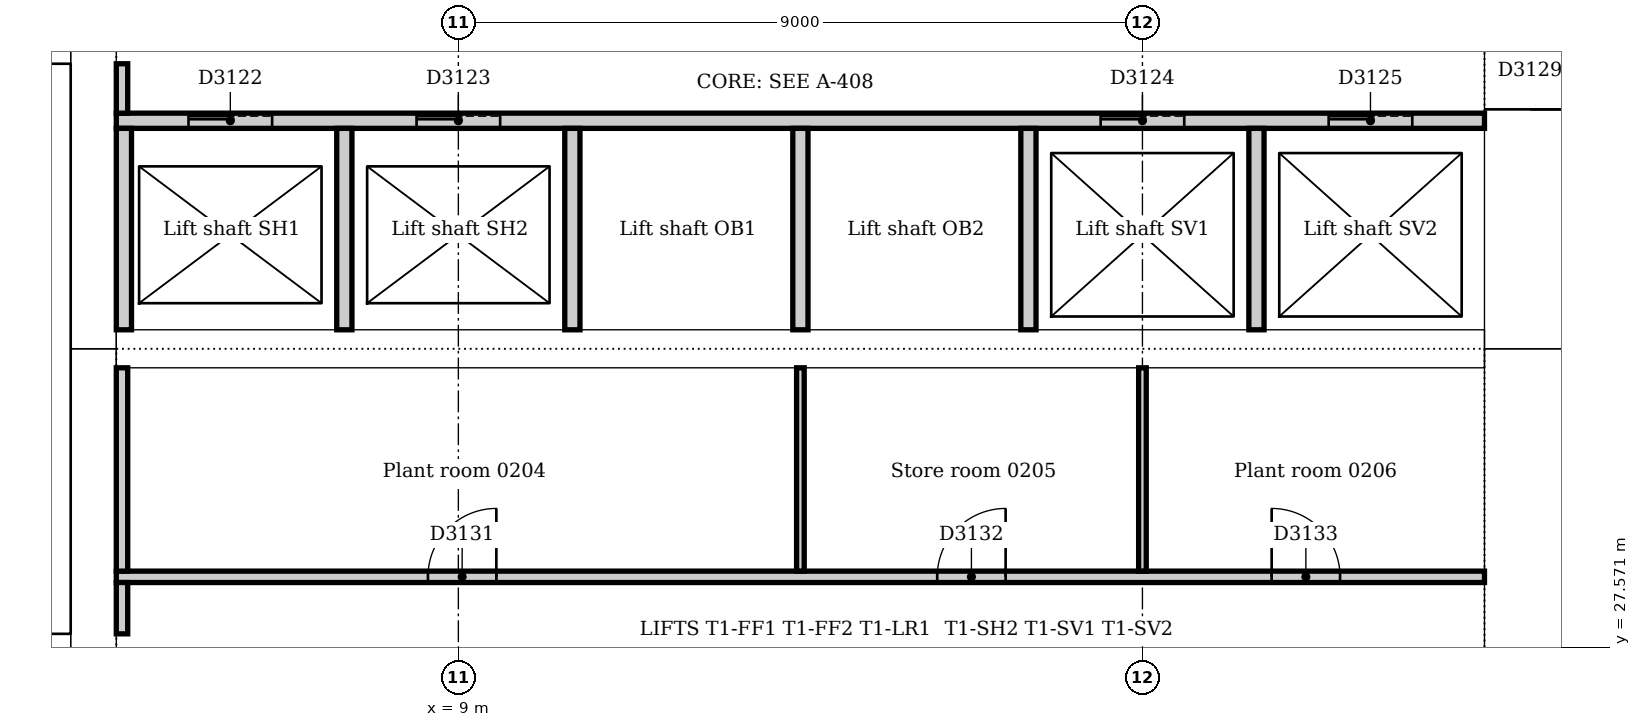
"""IFC4 building model, lengths in metres.
Left out: names, types, materials, properties, quantities, classifications, styles, units other than length and angle.
Written with IfcOpenShell. Run it as: python <this file> out.ifc"""

import sys

from ifc_helpers import new_model, si_unit, direction, frame, frame_2d, origin, place, context, subcontext, project, spatial, rectangle, extrude, element, fill, save


model = new_model("IFC4")
c1 = context("Model", 3, precision=1e-05, world=origin(), true_north=direction((0.0, 1.0)))
c2 = subcontext(c1, "Body", "Model", "MODEL_VIEW")
j1 = project(units=[si_unit("LENGTHUNIT", "METRE"), si_unit("PLANEANGLEUNIT", "RADIAN")], contexts=[c1])
p1 = place(None, origin())
s1 = spatial("IfcSite", under=j1, at=p1, CompositionType="ELEMENT")
p2 = place(p1, origin())
s2 = spatial("IfcBuilding", under=s1, at=p2, CompositionType="ELEMENT")
p3 = place(p2, frame((0.0, 0.0, 11.0)))
s3 = spatial("IfcBuildingStorey", under=s2, at=p3, CompositionType="ELEMENT", Elevation=11.0)
p4 = place(p3, frame((23.1, 21.0, 0.0), z_axis=(0.0, 0.0, 1.0), x_axis=(0.0, 1.0, 0.0)))
e1 = element("IfcWall", 1, at=p4, inside=s3, PredefinedType="SOLIDWALL", context=c2, shape_type="SweptSolid", body=[
    extrude(rectangle(XDim=10.5, YDim=1.2, at=frame_2d((5.25, 0.0))), origin(), (0.0, 0.0, 1.0), 5.0),
])
p5 = place(p4, frame((4.35, 0.0, 0.0)))
e2 = element("IfcOpeningElement", 2, at=p5, cuts=e1, PredefinedType="OPENING", context=c2, shape_type="SweptSolid", body=[
    extrude(rectangle(XDim=1.8, YDim=2.1, at=frame_2d((0.9, 1.05))), frame((0.0, 0.61, 0.0), z_axis=(0.0, -1.0, 0.0), x_axis=(1.0, 0.0, 0.0)), (0.0, 0.0, 1.0), 1.22),
])
p6 = place(p3, frame((23.1, 31.5, 0.0), z_axis=(0.0, 0.0, 1.0), x_axis=(0.0, 1.0, 0.0)))
e3 = element("IfcWall", 3, at=p6, inside=s3, PredefinedType="SOLIDWALL", context=c2, shape_type="SweptSolid", body=[
    extrude(rectangle(XDim=10.5, YDim=1.2, at=frame_2d((5.25, 0.0))), origin(), (0.0, 0.0, 1.0), 5.0),
])
p7 = place(p6, frame((3.15, 0.0, 0.0)))
e4 = element("IfcOpeningElement", 4, at=p7, cuts=e3, PredefinedType="OPENING", context=c2, shape_type="SweptSolid", body=[
    extrude(rectangle(XDim=1.0, YDim=2.1, at=frame_2d((0.5, 1.05))), frame((0.0, 0.61, 0.0), z_axis=(0.0, -1.0, 0.0), x_axis=(1.0, 0.0, 0.0)), (0.0, 0.0, 1.0), 1.22),
])
p8 = place(p6, frame((5.2, 0.0, 0.0)))
e5 = element("IfcOpeningElement", 5, at=p8, cuts=e3, PredefinedType="OPENING", context=c2, shape_type="SweptSolid", body=[
    extrude(rectangle(XDim=1.0, YDim=2.1, at=frame_2d((0.5, 1.05))), frame((0.0, 0.61, 0.0), z_axis=(0.0, -1.0, 0.0), x_axis=(1.0, 0.0, 0.0)), (0.0, 0.0, 1.0), 1.22),
])
p9 = place(p3, frame((4.2, 42.0, 0.0), z_axis=(0.0, 0.0, 1.0), x_axis=(0.0, -1.0, 0.0)))
e6 = element("IfcWall", 6, at=p9, inside=s3, PredefinedType="SOLIDWALL", context=c2, shape_type="SweptSolid", body=[
    extrude(rectangle(XDim=10.5, YDim=0.6, at=frame_2d((5.25, 0.0))), origin(), (0.0, 0.0, 1.0), 5.0),
])
p10 = place(p9, frame((5.3, 0.0, 0.0)))
e7 = element("IfcOpeningElement", 7, at=p10, cuts=e6, PredefinedType="OPENING", context=c2, shape_type="SweptSolid", body=[
    extrude(rectangle(XDim=1.0, YDim=2.1, at=frame_2d((0.5, 1.05))), frame((0.0, 0.31, 0.0), z_axis=(0.0, -1.0, 0.0), x_axis=(1.0, 0.0, 0.0)), (0.0, 0.0, 1.0), 0.62),
])
p11 = place(p3, frame((4.2, 31.5, 0.0), z_axis=(0.0, 0.0, 1.0), x_axis=(0.0, -1.0, 0.0)))
e8 = element("IfcWall", 8, at=p11, inside=s3, PredefinedType="SOLIDWALL", context=c2, shape_type="SweptSolid", body=[
    extrude(rectangle(XDim=10.5, YDim=0.6, at=frame_2d((5.25, 0.0))), origin(), (0.0, 0.0, 1.0), 5.0),
])
p12 = place(p11, frame((4.25, 0.0, 0.0)))
e9 = element("IfcOpeningElement", 9, at=p12, cuts=e8, PredefinedType="OPENING", context=c2, shape_type="SweptSolid", body=[
    extrude(rectangle(XDim=1.0, YDim=2.1, at=frame_2d((0.5, 1.05))), frame((0.0, 0.31, 0.0), z_axis=(0.0, -1.0, 0.0), x_axis=(1.0, 0.0, 0.0)), (0.0, 0.0, 1.0), 0.62),
])
p13 = place(p3, frame((4.5, 31.5, 0.0), z_axis=(0.0, 0.0, 1.0), x_axis=(1.0, 0.0, 0.0)))
e10 = element("IfcWall", 10, at=p13, inside=s3, PredefinedType="SOLIDWALL", context=c2, shape_type="SweptSolid", body=[
    extrude(rectangle(XDim=18.0, YDim=0.5, at=frame_2d((9.0, 0.0))), origin(), (0.0, 0.0, 1.0), 5.0),
])
p14 = place(p3, frame((3.9, 27.625, 0.0), z_axis=(0.0, 0.0, 1.0), x_axis=(-1.0, 0.0, 0.0)))
e11 = element("IfcWall", 11, at=p14, inside=s3, PredefinedType="SOLIDWALL", context=c2, shape_type="SweptSolid", body=[
    extrude(rectangle(XDim=3.54, YDim=0.25, at=frame_2d((1.77, 0.0))), origin(), (0.0, 0.0, 1.0), 5.0),
])
p15 = place(p14, frame((0.4, 0.0, 0.0)))
e12 = element("IfcOpeningElement", 12, at=p15, cuts=e11, PredefinedType="OPENING", context=c2, shape_type="SweptSolid", body=[
    extrude(rectangle(XDim=1.0, YDim=2.1, at=frame_2d((0.5, 1.05))), frame((0.0, 0.135, 0.0), z_axis=(0.0, -1.0, 0.0), x_axis=(1.0, 0.0, 0.0)), (0.0, 0.0, 1.0), 0.27),
])
p16 = place(p3, frame((0.36, 35.375, 0.0), z_axis=(0.0, 0.0, 1.0), x_axis=(1.0, 0.0, 0.0)))
e13 = element("IfcWall", 13, at=p16, inside=s3, PredefinedType="SOLIDWALL", context=c2, shape_type="SweptSolid", body=[
    extrude(rectangle(XDim=3.54, YDim=0.25, at=frame_2d((1.77, 0.0))), origin(), (0.0, 0.0, 1.0), 5.0),
])
p17 = place(p16, frame((2.14, 0.0, 0.0)))
e14 = element("IfcOpeningElement", 14, at=p17, cuts=e13, PredefinedType="OPENING", context=c2, shape_type="SweptSolid", body=[
    extrude(rectangle(XDim=1.0, YDim=2.1, at=frame_2d((0.5, 1.05))), frame((0.0, 0.135, 0.0), z_axis=(0.0, -1.0, 0.0), x_axis=(1.0, 0.0, 0.0)), (0.0, 0.0, 1.0), 0.27),
])
p18 = place(p3, frame((4.5, 34.5, 0.0), z_axis=(0.0, 0.0, 1.0), x_axis=(1.0, 0.0, 0.0)))
e15 = element("IfcWall", 15, at=p18, inside=s3, PredefinedType="PARTITIONING", context=c2, shape_type="SweptSolid", body=[
    extrude(rectangle(XDim=18.0, YDim=0.2, at=frame_2d((9.0, 0.0))), origin(), (0.0, 0.0, 1.0), 4.7),
])
p19 = place(p18, frame((0.95, 0.0, 0.0)))
e16 = element("IfcOpeningElement", 16, at=p19, cuts=e15, PredefinedType="OPENING", context=c2, shape_type="SweptSolid", body=[
    extrude(rectangle(XDim=1.1, YDim=2.1, at=frame_2d((0.55, 1.05))), frame((0.0, 0.11, 0.0), z_axis=(0.0, -1.0, 0.0), x_axis=(1.0, 0.0, 0.0)), (0.0, 0.0, 1.0), 0.22),
])
p20 = place(p18, frame((3.95, 0.0, 0.0)))
e17 = element("IfcOpeningElement", 17, at=p20, cuts=e15, PredefinedType="OPENING", context=c2, shape_type="SweptSolid", body=[
    extrude(rectangle(XDim=1.1, YDim=2.1, at=frame_2d((0.55, 1.05))), frame((0.0, 0.11, 0.0), z_axis=(0.0, -1.0, 0.0), x_axis=(1.0, 0.0, 0.0)), (0.0, 0.0, 1.0), 0.22),
])
p21 = place(p18, frame((12.95, 0.0, 0.0)))
e18 = element("IfcOpeningElement", 18, at=p21, cuts=e15, PredefinedType="OPENING", context=c2, shape_type="SweptSolid", body=[
    extrude(rectangle(XDim=1.1, YDim=2.1, at=frame_2d((0.55, 1.05))), frame((0.0, 0.11, 0.0), z_axis=(0.0, -1.0, 0.0), x_axis=(1.0, 0.0, 0.0)), (0.0, 0.0, 1.0), 0.22),
])
p22 = place(p18, frame((15.95, 0.0, 0.0)))
e19 = element("IfcOpeningElement", 19, at=p22, cuts=e15, PredefinedType="OPENING", context=c2, shape_type="SweptSolid", body=[
    extrude(rectangle(XDim=1.1, YDim=2.1, at=frame_2d((0.55, 1.05))), frame((0.0, 0.11, 0.0), z_axis=(0.0, -1.0, 0.0), x_axis=(1.0, 0.0, 0.0)), (0.0, 0.0, 1.0), 0.22),
])
for number, where, z_axis, x_axis in (
    (20, (4.6, 31.75, 0.0), (0.0, 0.0, 1.0), (0.0, 1.0, 0.0)),
    (21, (7.5, 31.75, 0.0), (0.0, 0.0, 1.0), (0.0, 1.0, 0.0)),
    (22, (10.5, 31.75, 0.0), (0.0, 0.0, 1.0), (0.0, 1.0, 0.0)),
    (23, (13.5, 31.75, 0.0), (0.0, 0.0, 1.0), (0.0, 1.0, 0.0)),
    (24, (16.5, 31.75, 0.0), (0.0, 0.0, 1.0), (0.0, 1.0, 0.0)),
    (25, (19.5, 31.75, 0.0), (0.0, 0.0, 1.0), (0.0, 1.0, 0.0)),
):
    element("IfcWall", number, at=place(p3, frame(where, z_axis=z_axis, x_axis=x_axis)), inside=s3, PredefinedType="PARTITIONING", context=c2, shape_type="SweptSolid", body=[
        extrude(rectangle(XDim=2.65, YDim=0.2, at=frame_2d((1.325, 0.0))), origin(), (0.0, 0.0, 1.0), 4.7),
    ])
p23 = place(p3, frame((4.5, 28.5, 0.0), z_axis=(0.0, 0.0, 1.0), x_axis=(1.0, 0.0, 0.0)))
e26 = element("IfcWall", 26, at=p23, inside=s3, PredefinedType="PARTITIONING", context=c2, shape_type="SweptSolid", body=[
    extrude(rectangle(XDim=18.0, YDim=0.15, at=frame_2d((9.0, 0.0))), origin(), (0.0, 0.0, 1.0), 4.7),
])
p24 = place(p23, frame((4.1, 0.0, 0.0)))
e27 = element("IfcOpeningElement", 27, at=p24, cuts=e26, PredefinedType="OPENING", context=c2, shape_type="SweptSolid", body=[
    extrude(rectangle(XDim=0.9, YDim=2.1, at=frame_2d((0.45, 1.05))), frame((0.0, 0.085, 0.0), z_axis=(0.0, -1.0, 0.0), x_axis=(1.0, 0.0, 0.0)), (0.0, 0.0, 1.0), 0.17),
])
p25 = place(p23, frame((10.8, 0.0, 0.0)))
e28 = element("IfcOpeningElement", 28, at=p25, cuts=e26, PredefinedType="OPENING", context=c2, shape_type="SweptSolid", body=[
    extrude(rectangle(XDim=0.9, YDim=2.1, at=frame_2d((0.45, 1.05))), frame((0.0, 0.085, 0.0), z_axis=(0.0, -1.0, 0.0), x_axis=(1.0, 0.0, 0.0)), (0.0, 0.0, 1.0), 0.17),
])
p26 = place(p23, frame((15.2, 0.0, 0.0)))
e29 = element("IfcOpeningElement", 29, at=p26, cuts=e26, PredefinedType="OPENING", context=c2, shape_type="SweptSolid", body=[
    extrude(rectangle(XDim=0.9, YDim=2.1, at=frame_2d((0.45, 1.05))), frame((0.0, 0.085, 0.0), z_axis=(0.0, -1.0, 0.0), x_axis=(1.0, 0.0, 0.0)), (0.0, 0.0, 1.0), 0.17),
])
p27 = place(p3, frame((4.575, 27.75, 0.0), z_axis=(0.0, 0.0, 1.0), x_axis=(0.0, 1.0, 0.0)))
e30 = element("IfcWall", 30, at=p27, inside=s3, PredefinedType="PARTITIONING", context=c2, shape_type="SweptSolid", body=[
    extrude(rectangle(XDim=0.675, YDim=0.15, at=frame_2d((0.338, 0.0))), origin(), (0.0, 0.0, 1.0), 4.7),
])
p28 = place(p3, frame((4.575, 28.575, 0.0), z_axis=(0.0, 0.0, 1.0), x_axis=(0.0, 1.0, 0.0)))
e31 = element("IfcWall", 31, at=p28, inside=s3, PredefinedType="PARTITIONING", context=c2, shape_type="SweptSolid", body=[
    extrude(rectangle(XDim=2.675, YDim=0.15, at=frame_2d((1.337, 0.0))), origin(), (0.0, 0.0, 1.0), 4.7),
])
p29 = place(p3, frame((4.575, 34.6, 0.0), z_axis=(0.0, 0.0, 1.0), x_axis=(0.0, 1.0, 0.0)))
e32 = element("IfcWall", 32, at=p29, inside=s3, PredefinedType="PARTITIONING", context=c2, shape_type="SweptSolid", body=[
    extrude(rectangle(XDim=0.65, YDim=0.15, at=frame_2d((0.325, 0.0))), origin(), (0.0, 0.0, 1.0), 4.7),
])
for number, where, z_axis, x_axis in (
    (33, (13.5, 28.575, 0.0), (0.0, 0.0, 1.0), (0.0, 1.0, 0.0)),
    (34, (18.0, 28.575, 0.0), (0.0, 0.0, 1.0), (0.0, 1.0, 0.0)),
):
    element("IfcWall", number, at=place(p3, frame(where, z_axis=z_axis, x_axis=x_axis)), inside=s3, PredefinedType="PARTITIONING", context=c2, shape_type="SweptSolid", body=[
        extrude(rectangle(XDim=2.675, YDim=0.1, at=frame_2d((1.337, 0.0))), origin(), (0.0, 0.0, 1.0), 4.7),
    ])
p30 = place(p19, origin())
e35 = element("IfcDoor", 35, at=p30, inside=s3, OperationType="SLIDING_TO_LEFT", PredefinedType="DOOR", context=c2, shape_type="SweptSolid", body=[
    extrude(rectangle(XDim=1.1, YDim=2.1, at=frame_2d((0.55, 1.05))), frame((0.0, 0.025, 0.0), z_axis=(0.0, -1.0, 0.0), x_axis=(1.0, 0.0, 0.0)), (0.0, 0.0, 1.0), 0.05),
])
fill(e16, e35)
p31 = place(p20, origin())
e36 = element("IfcDoor", 36, at=p31, inside=s3, OperationType="SLIDING_TO_LEFT", PredefinedType="DOOR", context=c2, shape_type="SweptSolid", body=[
    extrude(rectangle(XDim=1.1, YDim=2.1, at=frame_2d((0.55, 1.05))), frame((0.0, 0.025, 0.0), z_axis=(0.0, -1.0, 0.0), x_axis=(1.0, 0.0, 0.0)), (0.0, 0.0, 1.0), 0.05),
])
fill(e17, e36)
p32 = place(p21, origin())
e37 = element("IfcDoor", 37, at=p32, inside=s3, OperationType="SLIDING_TO_LEFT", PredefinedType="DOOR", context=c2, shape_type="SweptSolid", body=[
    extrude(rectangle(XDim=1.1, YDim=2.1, at=frame_2d((0.55, 1.05))), frame((0.0, 0.025, 0.0), z_axis=(0.0, -1.0, 0.0), x_axis=(1.0, 0.0, 0.0)), (0.0, 0.0, 1.0), 0.05),
])
fill(e18, e37)
p33 = place(p22, origin())
e38 = element("IfcDoor", 38, at=p33, inside=s3, OperationType="SLIDING_TO_LEFT", PredefinedType="DOOR", context=c2, shape_type="SweptSolid", body=[
    extrude(rectangle(XDim=1.1, YDim=2.1, at=frame_2d((0.55, 1.05))), frame((0.0, 0.025, 0.0), z_axis=(0.0, -1.0, 0.0), x_axis=(1.0, 0.0, 0.0)), (0.0, 0.0, 1.0), 0.05),
])
fill(e19, e38)
p34 = place(p7, frame((1.0, 0.0, 0.0), z_axis=(0.0, 0.0, 1.0), x_axis=(-1.0, 0.0, 0.0)))
e39 = element("IfcDoor", 39, at=p34, inside=s3, OperationType="SINGLE_SWING_RIGHT", PredefinedType="DOOR", context=c2, shape_type="SweptSolid", body=[
    extrude(rectangle(XDim=1.0, YDim=2.1, at=frame_2d((0.5, 1.05))), frame((0.0, 0.025, 0.0), z_axis=(0.0, -1.0, 0.0), x_axis=(1.0, 0.0, 0.0)), (0.0, 0.0, 1.0), 0.05),
])
fill(e4, e39)
p35 = place(p24, origin())
e40 = element("IfcDoor", 40, at=p35, inside=s3, OperationType="SINGLE_SWING_RIGHT", PredefinedType="DOOR", context=c2, shape_type="SweptSolid", body=[
    extrude(rectangle(XDim=0.9, YDim=2.1, at=frame_2d((0.45, 1.05))), frame((0.0, 0.025, 0.0), z_axis=(0.0, -1.0, 0.0), x_axis=(1.0, 0.0, 0.0)), (0.0, 0.0, 1.0), 0.05),
])
fill(e27, e40)
p36 = place(p25, origin())
e41 = element("IfcDoor", 41, at=p36, inside=s3, OperationType="SINGLE_SWING_RIGHT", PredefinedType="DOOR", context=c2, shape_type="SweptSolid", body=[
    extrude(rectangle(XDim=0.9, YDim=2.1, at=frame_2d((0.45, 1.05))), frame((0.0, 0.025, 0.0), z_axis=(0.0, -1.0, 0.0), x_axis=(1.0, 0.0, 0.0)), (0.0, 0.0, 1.0), 0.05),
])
fill(e28, e41)
p37 = place(p26, origin())
e42 = element("IfcDoor", 42, at=p37, inside=s3, OperationType="SINGLE_SWING_LEFT", PredefinedType="DOOR", context=c2, shape_type="SweptSolid", body=[
    extrude(rectangle(XDim=0.9, YDim=2.1, at=frame_2d((0.45, 1.05))), frame((0.0, 0.025, 0.0), z_axis=(0.0, -1.0, 0.0), x_axis=(1.0, 0.0, 0.0)), (0.0, 0.0, 1.0), 0.05),
])
fill(e29, e42)
save(model, sys.argv[1])
